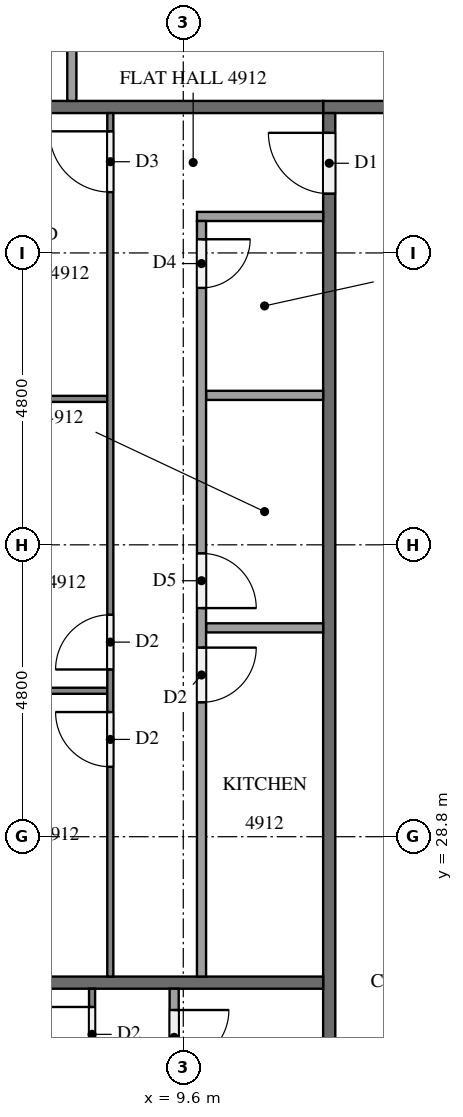
"""IFC4 building model, lengths in metres.
Left out: names, types, materials, properties, quantities, classifications, styles, units other than length and angle.
Written with IfcOpenShell. Run it as: python <this file> out.ifc"""

import sys

from ifc_helpers import new_model, si_unit, direction, frame, frame_2d, origin, place, context, subcontext, project, spatial, rectangle, extrude, element, fill, save


model = new_model("IFC4")
c1 = context("Model", 3, precision=1e-05, world=origin(), true_north=direction((0.0, 1.0)))
c2 = subcontext(c1, "Body", "Model", "MODEL_VIEW")
j1 = project(units=[si_unit("LENGTHUNIT", "METRE"), si_unit("PLANEANGLEUNIT", "RADIAN")], contexts=[c1])
p1 = place(None, origin())
s1 = spatial("IfcSite", under=j1, at=p1, CompositionType="ELEMENT")
p2 = place(p1, origin())
s2 = spatial("IfcBuilding", under=s1, at=p2, CompositionType="ELEMENT")
p3 = place(p2, frame((0.0, 0.0, 189.4)))
s3 = spatial("IfcBuildingStorey", under=s2, at=p3, CompositionType="ELEMENT", Elevation=189.4)
p4 = place(p3, frame((11.9, 40.8, 0.0), z_axis=(0.0, 0.0, 1.0), x_axis=(1.0, 0.0, 0.0)))
e1 = element("IfcWall", 1, at=p4, inside=s3, PredefinedType="PARTITIONING", context=c2, shape_type="SweptSolid", body=[
    extrude(rectangle(XDim=38.6, YDim=0.2, at=frame_2d((19.3, 0.0))), origin(), (0.0, 0.0, 1.0), 3.2),
])
p5 = place(p4, frame((34.125, 0.0, 0.0)))
e2 = element("IfcOpeningElement", 2, at=p5, cuts=e1, PredefinedType="OPENING", context=c2, shape_type="SweptSolid", body=[
    extrude(rectangle(XDim=1.0, YDim=2.1, at=frame_2d((0.5, 1.05))), frame((0.0, 0.11, 0.0), z_axis=(0.0, -1.0, 0.0), x_axis=(1.0, 0.0, 0.0)), (0.0, 0.0, 1.0), 0.22),
])
p6 = place(p4, frame((24.525, 0.0, 0.0)))
e3 = element("IfcOpeningElement", 3, at=p6, cuts=e1, PredefinedType="OPENING", context=c2, shape_type="SweptSolid", body=[
    extrude(rectangle(XDim=1.0, YDim=2.1, at=frame_2d((0.5, 1.05))), frame((0.0, 0.11, 0.0), z_axis=(0.0, -1.0, 0.0), x_axis=(1.0, 0.0, 0.0)), (0.0, 0.0, 1.0), 0.22),
])
p7 = place(p4, frame((7.725, 0.0, 0.0)))
e4 = element("IfcOpeningElement", 4, at=p7, cuts=e1, PredefinedType="OPENING", context=c2, shape_type="SweptSolid", body=[
    extrude(rectangle(XDim=1.0, YDim=2.1, at=frame_2d((0.5, 1.05))), frame((0.0, 0.11, 0.0), z_axis=(0.0, -1.0, 0.0), x_axis=(1.0, 0.0, 0.0)), (0.0, 0.0, 1.0), 0.22),
])
p8 = place(p4, frame((5.875, 0.0, 0.0)))
e5 = element("IfcOpeningElement", 5, at=p8, cuts=e1, PredefinedType="OPENING", context=c2, shape_type="SweptSolid", body=[
    extrude(rectangle(XDim=1.0, YDim=2.1, at=frame_2d((0.5, 1.05))), frame((0.0, 0.11, 0.0), z_axis=(0.0, -1.0, 0.0), x_axis=(1.0, 0.0, 0.0)), (0.0, 0.0, 1.0), 0.22),
])
p9 = place(p3, frame((12.0, 12.1, 0.0), z_axis=(0.0, 0.0, 1.0), x_axis=(0.0, 1.0, 0.0)))
e6 = element("IfcWall", 6, at=p9, inside=s3, PredefinedType="PARTITIONING", context=c2, shape_type="SweptSolid", body=[
    extrude(rectangle(XDim=28.6, YDim=0.2, at=frame_2d((14.3, 0.0))), origin(), (0.0, 0.0, 1.0), 3.2),
])
p10 = place(p9, frame((27.275, 0.0, 0.0)))
e7 = element("IfcOpeningElement", 7, at=p10, cuts=e6, PredefinedType="OPENING", context=c2, shape_type="SweptSolid", body=[
    extrude(rectangle(XDim=1.0, YDim=2.1, at=frame_2d((0.5, 1.05))), frame((0.0, 0.11, 0.0), z_axis=(0.0, -1.0, 0.0), x_axis=(1.0, 0.0, 0.0)), (0.0, 0.0, 1.0), 0.22),
])
p11 = place(p9, frame((0.325, 0.0, 0.0)))
e8 = element("IfcOpeningElement", 8, at=p11, cuts=e6, PredefinedType="OPENING", context=c2, shape_type="SweptSolid", body=[
    extrude(rectangle(XDim=1.0, YDim=2.1, at=frame_2d((0.5, 1.05))), frame((0.0, 0.11, 0.0), z_axis=(0.0, -1.0, 0.0), x_axis=(1.0, 0.0, 0.0)), (0.0, 0.0, 1.0), 0.22),
])
for number, where, z_axis, x_axis in (
    (9, (4.9, 40.8, 0.0), (0.0, 0.0, 1.0), (1.0, 0.0, 0.0)),
    (10, (4.9, 26.4, 0.0), (0.0, 0.0, 1.0), (1.0, 0.0, 0.0)),
):
    element("IfcWall", number, at=place(p3, frame(where, z_axis=z_axis, x_axis=x_axis)), inside=s3, PredefinedType="PARTITIONING", context=c2, shape_type="SweptSolid", body=[
        extrude(rectangle(XDim=7.0, YDim=0.2, at=frame_2d((3.5, 0.0))), origin(), (0.0, 0.0, 1.0), 3.2),
    ])
p12 = place(p3, frame((7.767, 40.9, 0.0), z_axis=(0.0, 0.0, 1.0), x_axis=(0.0, 1.0, 0.0)))
e11 = element("IfcWall", 11, at=p12, inside=s3, PredefinedType="PARTITIONING", context=c2, shape_type="SweptSolid", body=[
    extrude(rectangle(XDim=2.075, YDim=0.15, at=frame_2d((1.038, 0.0))), origin(), (0.0, 0.0, 1.0), 3.2),
])
for number, where, z_axis, x_axis in (
    (12, (8.35, 36.0, 0.0), (0.0, 0.0, 1.0), (-1.0, 0.0, 0.0)),
    (13, (8.35, 31.2, 0.0), (0.0, 0.0, 1.0), (-1.0, 0.0, 0.0)),
):
    element("IfcWall", number, at=place(p3, frame(where, z_axis=z_axis, x_axis=x_axis)), inside=s3, PredefinedType="PARTITIONING", context=c2, shape_type="SweptSolid", body=[
        extrude(rectangle(XDim=3.45, YDim=0.1, at=frame_2d((1.725, 0.0))), origin(), (0.0, 0.0, 1.0), 3.2),
    ])
p13 = place(p3, frame((8.4, 26.5, 0.0), z_axis=(0.0, 0.0, 1.0), x_axis=(0.0, 1.0, 0.0)))
e14 = element("IfcWall", 14, at=p13, inside=s3, PredefinedType="PARTITIONING", context=c2, shape_type="SweptSolid", body=[
    extrude(rectangle(XDim=14.2, YDim=0.1, at=frame_2d((7.1, 0.0))), origin(), (0.0, 0.0, 1.0), 3.2),
])
p14 = place(p13, frame((12.9, 0.0, 0.0)))
e15 = element("IfcOpeningElement", 15, at=p14, cuts=e14, PredefinedType="OPENING", context=c2, shape_type="SweptSolid", body=[
    extrude(rectangle(XDim=1.0, YDim=2.1, at=frame_2d((0.5, 1.05))), frame((0.0, 0.06, 0.0), z_axis=(0.0, -1.0, 0.0), x_axis=(1.0, 0.0, 0.0)), (0.0, 0.0, 1.0), 0.12),
])
p15 = place(p13, frame((5.05, 0.0, 0.0)))
e16 = element("IfcOpeningElement", 16, at=p15, cuts=e14, PredefinedType="OPENING", context=c2, shape_type="SweptSolid", body=[
    extrude(rectangle(XDim=0.9, YDim=2.1, at=frame_2d((0.45, 1.05))), frame((0.0, 0.06, 0.0), z_axis=(0.0, -1.0, 0.0), x_axis=(1.0, 0.0, 0.0)), (0.0, 0.0, 1.0), 0.12),
])
p16 = place(p13, frame((3.45, 0.0, 0.0)))
e17 = element("IfcOpeningElement", 17, at=p16, cuts=e14, PredefinedType="OPENING", context=c2, shape_type="SweptSolid", body=[
    extrude(rectangle(XDim=0.9, YDim=2.1, at=frame_2d((0.45, 1.05))), frame((0.0, 0.06, 0.0), z_axis=(0.0, -1.0, 0.0), x_axis=(1.0, 0.0, 0.0)), (0.0, 0.0, 1.0), 0.12),
])
for number, where, z_axis, x_axis in (
    (18, (11.9, 36.058, 0.0), (0.0, 0.0, 1.0), (-1.0, 0.0, 0.0)),
    (19, (11.9, 32.235, 0.0), (0.0, 0.0, 1.0), (-1.0, 0.0, 0.0)),
):
    element("IfcWall", number, at=place(p3, frame(where, z_axis=z_axis, x_axis=x_axis)), inside=s3, PredefinedType="PARTITIONING", context=c2, shape_type="SweptSolid", body=[
        extrude(rectangle(XDim=1.925, YDim=0.15, at=frame_2d((0.962, 0.0))), origin(), (0.0, 0.0, 1.0), 3.2),
    ])
p17 = place(p3, frame((11.9, 39.0, 0.0), z_axis=(0.0, 0.0, 1.0), x_axis=(-1.0, 0.0, 0.0)))
e20 = element("IfcWall", 20, at=p17, inside=s3, PredefinedType="PARTITIONING", context=c2, shape_type="SweptSolid", body=[
    extrude(rectangle(XDim=2.075, YDim=0.15, at=frame_2d((1.038, 0.0))), origin(), (0.0, 0.0, 1.0), 3.2),
])
p18 = place(p3, frame((9.9, 38.925, 0.0), z_axis=(0.0, 0.0, 1.0), x_axis=(0.0, -1.0, 0.0)))
e21 = element("IfcWall", 21, at=p18, inside=s3, PredefinedType="PARTITIONING", context=c2, shape_type="SweptSolid", body=[
    extrude(rectangle(XDim=12.425, YDim=0.15, at=frame_2d((6.212, 0.0))), origin(), (0.0, 0.0, 1.0), 3.2),
])
p19 = place(p18, frame((0.3, 0.0, 0.0)))
e22 = element("IfcOpeningElement", 22, at=p19, cuts=e21, PredefinedType="OPENING", context=c2, shape_type="SweptSolid", body=[
    extrude(rectangle(XDim=0.8, YDim=2.1, at=frame_2d((0.4, 1.05))), frame((0.0, 0.085, 0.0), z_axis=(0.0, -1.0, 0.0), x_axis=(1.0, 0.0, 0.0)), (0.0, 0.0, 1.0), 0.17),
])
p20 = place(p18, frame((5.465, 0.0, 0.0)))
e23 = element("IfcOpeningElement", 23, at=p20, cuts=e21, PredefinedType="OPENING", context=c2, shape_type="SweptSolid", body=[
    extrude(rectangle(XDim=0.9, YDim=2.1, at=frame_2d((0.45, 1.05))), frame((0.0, 0.085, 0.0), z_axis=(0.0, -1.0, 0.0), x_axis=(1.0, 0.0, 0.0)), (0.0, 0.0, 1.0), 0.17),
])
p21 = place(p18, frame((7.015, 0.0, 0.0)))
e24 = element("IfcOpeningElement", 24, at=p21, cuts=e21, PredefinedType="OPENING", context=c2, shape_type="SweptSolid", body=[
    extrude(rectangle(XDim=0.9, YDim=2.1, at=frame_2d((0.45, 1.05))), frame((0.0, 0.085, 0.0), z_axis=(0.0, -1.0, 0.0), x_axis=(1.0, 0.0, 0.0)), (0.0, 0.0, 1.0), 0.17),
])
p22 = place(p3, frame((8.1, 12.1, 0.0), z_axis=(0.0, 0.0, 1.0), x_axis=(0.0, 1.0, 0.0)))
e25 = element("IfcWall", 25, at=p22, inside=s3, PredefinedType="PARTITIONING", context=c2, shape_type="SweptSolid", body=[
    extrude(rectangle(XDim=14.2, YDim=0.1, at=frame_2d((7.1, 0.0))), origin(), (0.0, 0.0, 1.0), 3.2),
])
p23 = place(p22, frame((3.45, 0.0, 0.0)))
e26 = element("IfcOpeningElement", 26, at=p23, cuts=e25, PredefinedType="OPENING", context=c2, shape_type="SweptSolid", body=[
    extrude(rectangle(XDim=0.9, YDim=2.1, at=frame_2d((0.45, 1.05))), frame((0.0, 0.06, 0.0), z_axis=(0.0, -1.0, 0.0), x_axis=(1.0, 0.0, 0.0)), (0.0, 0.0, 1.0), 0.12),
])
p24 = place(p22, frame((5.05, 0.0, 0.0)))
e27 = element("IfcOpeningElement", 27, at=p24, cuts=e25, PredefinedType="OPENING", context=c2, shape_type="SweptSolid", body=[
    extrude(rectangle(XDim=1.0, YDim=2.1, at=frame_2d((0.5, 1.05))), frame((0.0, 0.06, 0.0), z_axis=(0.0, -1.0, 0.0), x_axis=(1.0, 0.0, 0.0)), (0.0, 0.0, 1.0), 0.12),
])
p25 = place(p22, frame((13.0, 0.0, 0.0)))
e28 = element("IfcOpeningElement", 28, at=p25, cuts=e25, PredefinedType="OPENING", context=c2, shape_type="SweptSolid", body=[
    extrude(rectangle(XDim=0.9, YDim=2.1, at=frame_2d((0.45, 1.05))), frame((0.0, 0.06, 0.0), z_axis=(0.0, -1.0, 0.0), x_axis=(1.0, 0.0, 0.0)), (0.0, 0.0, 1.0), 0.12),
])
p26 = place(p3, frame((9.45, 26.3, 0.0), z_axis=(0.0, 0.0, 1.0), x_axis=(0.0, -1.0, 0.0)))
e29 = element("IfcWall", 29, at=p26, inside=s3, PredefinedType="PARTITIONING", context=c2, shape_type="SweptSolid", body=[
    extrude(rectangle(XDim=12.425, YDim=0.15, at=frame_2d((6.212, 0.0))), origin(), (0.0, 0.0, 1.0), 3.2),
])
p27 = place(p26, frame((9.883, 0.0, 0.0)))
e30 = element("IfcOpeningElement", 30, at=p27, cuts=e29, PredefinedType="OPENING", context=c2, shape_type="SweptSolid", body=[
    extrude(rectangle(XDim=0.8, YDim=2.1, at=frame_2d((0.4, 1.05))), frame((0.0, 0.085, 0.0), z_axis=(0.0, -1.0, 0.0), x_axis=(1.0, 0.0, 0.0)), (0.0, 0.0, 1.0), 0.17),
])
p28 = place(p26, frame((8.333, 0.0, 0.0)))
e31 = element("IfcOpeningElement", 31, at=p28, cuts=e29, PredefinedType="OPENING", context=c2, shape_type="SweptSolid", body=[
    extrude(rectangle(XDim=0.9, YDim=2.1, at=frame_2d((0.45, 1.05))), frame((0.0, 0.085, 0.0), z_axis=(0.0, -1.0, 0.0), x_axis=(1.0, 0.0, 0.0)), (0.0, 0.0, 1.0), 0.17),
])
p29 = place(p26, frame((0.35, 0.0, 0.0)))
e32 = element("IfcOpeningElement", 32, at=p29, cuts=e29, PredefinedType="OPENING", context=c2, shape_type="SweptSolid", body=[
    extrude(rectangle(XDim=0.9, YDim=2.1, at=frame_2d((0.45, 1.05))), frame((0.0, 0.085, 0.0), z_axis=(0.0, -1.0, 0.0), x_axis=(1.0, 0.0, 0.0)), (0.0, 0.0, 1.0), 0.17),
])
p30 = place(p10, origin())
e33 = element("IfcDoor", 33, at=p30, inside=s3, OperationType="SINGLE_SWING_RIGHT", PredefinedType="DOOR", context=c2, shape_type="SweptSolid", body=[
    extrude(rectangle(XDim=1.0, YDim=2.1, at=frame_2d((0.5, 1.05))), frame((0.0, 0.025, 0.0), z_axis=(0.0, -1.0, 0.0), x_axis=(1.0, 0.0, 0.0)), (0.0, 0.0, 1.0), 0.05),
])
fill(e7, e33)
p31 = place(p14, origin())
e34 = element("IfcDoor", 34, at=p31, inside=s3, OperationType="SINGLE_SWING_RIGHT", PredefinedType="DOOR", context=c2, shape_type="SweptSolid", body=[
    extrude(rectangle(XDim=1.0, YDim=2.1, at=frame_2d((0.5, 1.05))), frame((0.0, 0.025, 0.0), z_axis=(0.0, -1.0, 0.0), x_axis=(1.0, 0.0, 0.0)), (0.0, 0.0, 1.0), 0.05),
])
fill(e15, e34)
p32 = place(p15, origin())
e35 = element("IfcDoor", 35, at=p32, inside=s3, OperationType="SINGLE_SWING_LEFT", PredefinedType="DOOR", context=c2, shape_type="SweptSolid", body=[
    extrude(rectangle(XDim=0.9, YDim=2.1, at=frame_2d((0.45, 1.05))), frame((0.0, 0.025, 0.0), z_axis=(0.0, -1.0, 0.0), x_axis=(1.0, 0.0, 0.0)), (0.0, 0.0, 1.0), 0.05),
])
fill(e16, e35)
p33 = place(p16, origin())
e36 = element("IfcDoor", 36, at=p33, inside=s3, OperationType="SINGLE_SWING_RIGHT", PredefinedType="DOOR", context=c2, shape_type="SweptSolid", body=[
    extrude(rectangle(XDim=0.9, YDim=2.1, at=frame_2d((0.45, 1.05))), frame((0.0, 0.025, 0.0), z_axis=(0.0, -1.0, 0.0), x_axis=(1.0, 0.0, 0.0)), (0.0, 0.0, 1.0), 0.05),
])
fill(e17, e36)
p34 = place(p19, origin())
e37 = element("IfcDoor", 37, at=p34, inside=s3, OperationType="SINGLE_SWING_LEFT", PredefinedType="DOOR", context=c2, shape_type="SweptSolid", body=[
    extrude(rectangle(XDim=0.8, YDim=2.1, at=frame_2d((0.4, 1.05))), frame((0.0, 0.025, 0.0), z_axis=(0.0, -1.0, 0.0), x_axis=(1.0, 0.0, 0.0)), (0.0, 0.0, 1.0), 0.05),
])
fill(e22, e37)
p35 = place(p20, origin())
e38 = element("IfcDoor", 38, at=p35, inside=s3, OperationType="SINGLE_SWING_RIGHT", PredefinedType="DOOR", context=c2, shape_type="SweptSolid", body=[
    extrude(rectangle(XDim=0.9, YDim=2.1, at=frame_2d((0.45, 1.05))), frame((0.0, 0.025, 0.0), z_axis=(0.0, -1.0, 0.0), x_axis=(1.0, 0.0, 0.0)), (0.0, 0.0, 1.0), 0.05),
])
fill(e23, e38)
p36 = place(p21, origin())
e39 = element("IfcDoor", 39, at=p36, inside=s3, OperationType="SINGLE_SWING_LEFT", PredefinedType="DOOR", context=c2, shape_type="SweptSolid", body=[
    extrude(rectangle(XDim=0.9, YDim=2.1, at=frame_2d((0.45, 1.05))), frame((0.0, 0.025, 0.0), z_axis=(0.0, -1.0, 0.0), x_axis=(1.0, 0.0, 0.0)), (0.0, 0.0, 1.0), 0.05),
])
fill(e24, e39)
p37 = place(p25, origin())
e40 = element("IfcDoor", 40, at=p37, inside=s3, OperationType="SINGLE_SWING_RIGHT", PredefinedType="DOOR", context=c2, shape_type="SweptSolid", body=[
    extrude(rectangle(XDim=0.9, YDim=2.1, at=frame_2d((0.45, 1.05))), frame((0.0, 0.025, 0.0), z_axis=(0.0, -1.0, 0.0), x_axis=(1.0, 0.0, 0.0)), (0.0, 0.0, 1.0), 0.05),
])
fill(e28, e40)
p38 = place(p29, origin())
e41 = element("IfcDoor", 41, at=p38, inside=s3, OperationType="SINGLE_SWING_LEFT", PredefinedType="DOOR", context=c2, shape_type="SweptSolid", body=[
    extrude(rectangle(XDim=0.9, YDim=2.1, at=frame_2d((0.45, 1.05))), frame((0.0, 0.025, 0.0), z_axis=(0.0, -1.0, 0.0), x_axis=(1.0, 0.0, 0.0)), (0.0, 0.0, 1.0), 0.05),
])
fill(e32, e41)
save(model, sys.argv[1])
